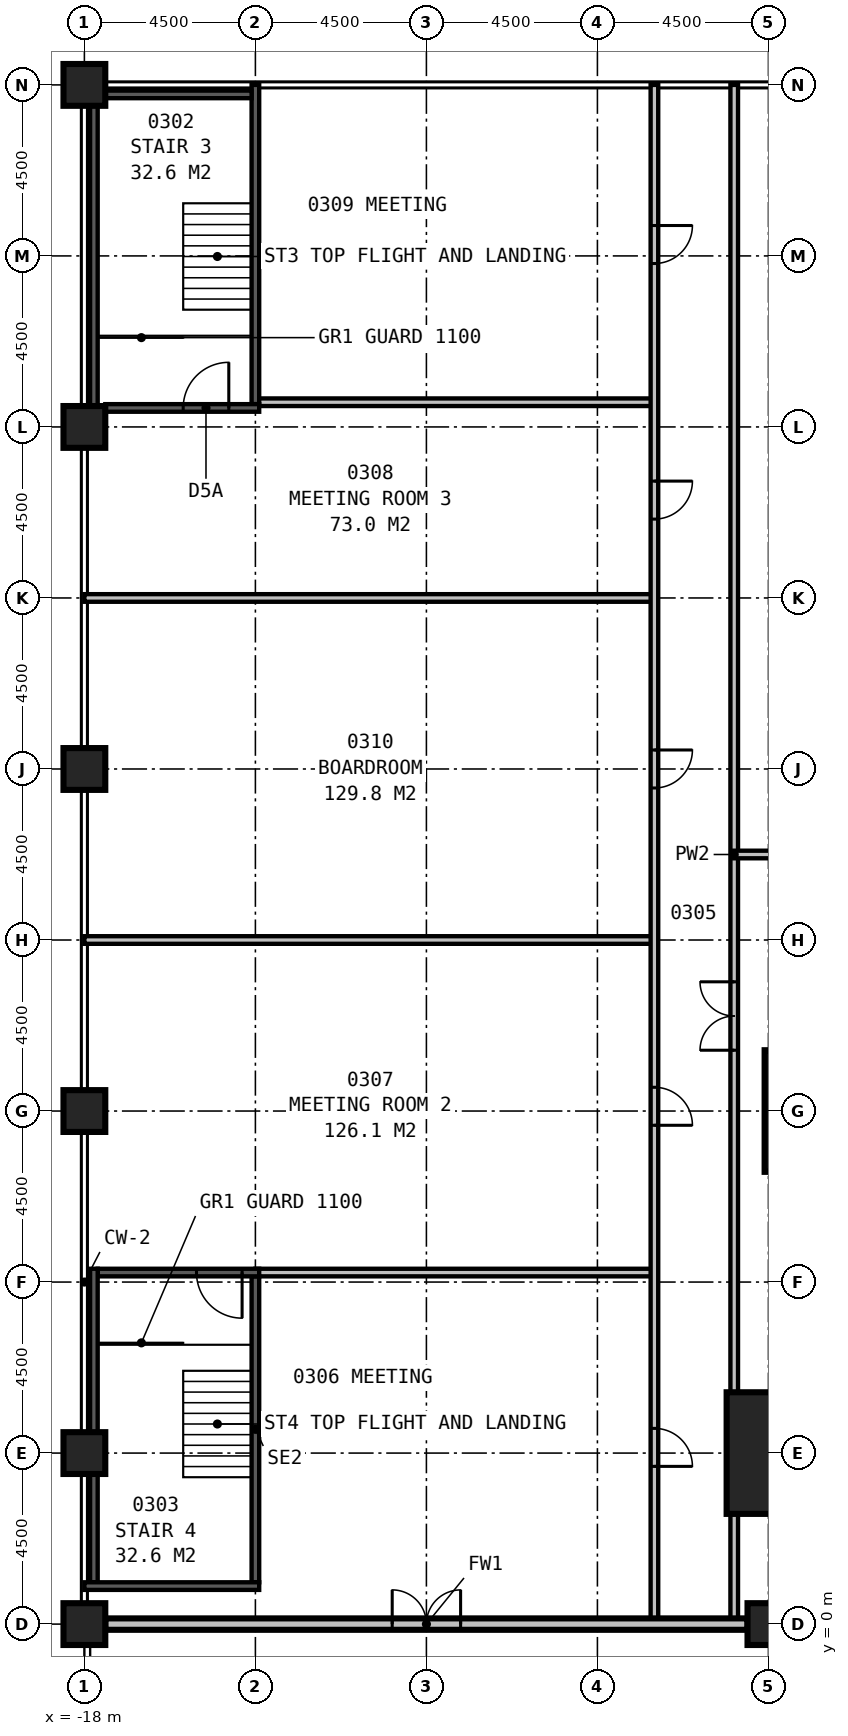
"""IFC4 building model, lengths in metres.
Left out: names, types, materials, properties, quantities, classifications, styles, units other than length and angle.
Written with IfcOpenShell. Run it as: python <this file> out.ifc"""

import sys

from ifc_helpers import new_model, si_unit, direction, frame, frame_2d, origin, origin_2d, place, context, subcontext, project, spatial, rectangle, extrude, element, fill, save


model = new_model("IFC4")
c1 = context("Model", 3, precision=1e-05, world=origin(), true_north=direction((0.0, 1.0)))
c2 = subcontext(c1, "Body", "Model", "MODEL_VIEW")
j1 = project(units=[si_unit("LENGTHUNIT", "METRE"), si_unit("PLANEANGLEUNIT", "RADIAN")], contexts=[c1])
p1 = place(None, origin())
s1 = spatial("IfcSite", under=j1, at=p1, CompositionType="ELEMENT")
p2 = place(p1, origin())
s2 = spatial("IfcBuilding", under=s1, at=p2, CompositionType="ELEMENT")
p3 = place(p2, frame((0.0, 0.0, 19.0)))
s3 = spatial("IfcBuildingStorey", under=s2, at=p3, CompositionType="ELEMENT", Elevation=19.0)
for number, where, z_axis, x_axis in (
    (1, (0.5, 4.5, 0.0), (0.0, 0.0, 1.0), (1.0, 0.0, 0.0)),
    (2, (1.5, 13.5, 0.0), (0.0, 0.0, 1.0), (1.0, 0.0, 0.0)),
):
    element("IfcColumn", number, at=place(p3, frame(where, z_axis=z_axis, x_axis=x_axis)), inside=s3, PredefinedType="COLUMN", context=c2, shape_type="SweptSolid", body=[
        extrude(rectangle(XDim=3.2, YDim=3.2, at=origin_2d()), origin(), (0.0, 0.0, 1.0), 5.0),
    ])
for number, where, z_axis, x_axis in (
    (3, (-18.0, 4.5, 0.0), (0.0, 0.0, 1.0), (1.0, 0.0, 0.0)),
    (4, (-18.0, 13.5, 0.0), (0.0, 0.0, 1.0), (1.0, 0.0, 0.0)),
    (5, (-18.0, 22.5, 0.0), (0.0, 0.0, 1.0), (1.0, 0.0, 0.0)),
    (6, (-18.0, 31.5, 0.0), (0.0, 0.0, 1.0), (1.0, 0.0, 0.0)),
    (7, (-18.0, 40.5, 0.0), (0.0, 0.0, 1.0), (1.0, 0.0, 0.0)),
    (8, (-18.0, 0.0, 0.0), (0.0, 0.0, 1.0), (1.0, 0.0, 0.0)),
    (9, (0.0, 0.0, 0.0), (0.0, 0.0, 1.0), (1.0, 0.0, 0.0)),
):
    element("IfcColumn", number, at=place(p3, frame(where, z_axis=z_axis, x_axis=x_axis)), inside=s3, PredefinedType="COLUMN", context=c2, shape_type="SweptSolid", body=[
        extrude(rectangle(XDim=1.1, YDim=1.1, at=origin_2d()), origin(), (0.0, 0.0, 1.0), 5.0),
    ])
p4 = place(p3, frame((-17.45, 0.0, 0.0), z_axis=(0.0, 0.0, 1.0), x_axis=(1.0, 0.0, 0.0)))
e10 = element("IfcWall", 10, at=p4, inside=s3, PredefinedType="STANDARD", context=c2, shape_type="SweptSolid", body=[
    extrude(rectangle(XDim=16.9, YDim=0.3, at=frame_2d((8.45, 0.0))), origin(), (0.0, 0.0, 1.0), 3.1),
])
p5 = place(p4, frame((7.55, 0.0, 0.0)))
e11 = element("IfcOpeningElement", 11, at=p5, cuts=e10, PredefinedType="OPENING", context=c2, shape_type="SweptSolid", body=[
    extrude(rectangle(XDim=1.8, YDim=2.4, at=frame_2d((0.9, 1.2))), frame((0.0, 0.16, 0.0), z_axis=(0.0, -1.0, 0.0), x_axis=(1.0, 0.0, 0.0)), (0.0, 0.0, 1.0), 0.32),
])
p6 = place(p3, frame((-17.45, 32.0, 0.0), z_axis=(0.0, 0.0, 1.0), x_axis=(1.0, 0.0, 0.0)))
e12 = element("IfcWall", 12, at=p6, inside=s3, PredefinedType="SOLIDWALL", context=c2, shape_type="SweptSolid", body=[
    extrude(rectangle(XDim=4.05, YDim=0.2, at=frame_2d((2.025, 0.0))), origin(), (0.0, 0.0, 1.0), 4.7),
])
p7 = place(p6, frame((2.05, 0.0, 0.0)))
e13 = element("IfcOpeningElement", 13, at=p7, cuts=e12, PredefinedType="OPENING", context=c2, shape_type="SweptSolid", body=[
    extrude(rectangle(XDim=1.2, YDim=2.1, at=frame_2d((0.6, 1.05))), frame((0.0, 0.11, 0.0), z_axis=(0.0, -1.0, 0.0), x_axis=(1.0, 0.0, 0.0)), (0.0, 0.0, 1.0), 0.22),
])
p8 = place(p3, frame((-13.5, 32.1, 0.0), z_axis=(0.0, 0.0, 1.0), x_axis=(0.0, 1.0, 0.0)))
e14 = element("IfcWall", 14, at=p8, inside=s3, PredefinedType="SOLIDWALL", context=c2, shape_type="SweptSolid", body=[
    extrude(rectangle(XDim=8.4, YDim=0.2, at=frame_2d((4.2, 0.0))), origin(), (0.0, 0.0, 1.0), 4.7),
])
p9 = place(p3, frame((-17.65, 9.25, 0.0), z_axis=(0.0, 0.0, 1.0), x_axis=(1.0, 0.0, 0.0)))
e15 = element("IfcWall", 15, at=p9, inside=s3, PredefinedType="SOLIDWALL", context=c2, shape_type="SweptSolid", body=[
    extrude(rectangle(XDim=4.25, YDim=0.2, at=frame_2d((2.125, 0.0))), origin(), (0.0, 0.0, 1.0), 4.7),
])
p10 = place(p9, frame((3.8, 0.0, 0.0), z_axis=(0.0, 0.0, 1.0), x_axis=(-1.0, 0.0, 0.0)))
e16 = element("IfcOpeningElement", 16, at=p10, cuts=e15, PredefinedType="OPENING", context=c2, shape_type="SweptSolid", body=[
    extrude(rectangle(XDim=1.2, YDim=2.1, at=frame_2d((0.6, 1.05))), frame((0.0, 0.11, 0.0), z_axis=(0.0, -1.0, 0.0), x_axis=(1.0, 0.0, 0.0)), (0.0, 0.0, 1.0), 0.22),
])
p11 = place(p3, frame((-18.0, 1.0, 0.0), z_axis=(0.0, 0.0, 1.0), x_axis=(1.0, 0.0, 0.0)))
e17 = element("IfcWall", 17, at=p11, inside=s3, PredefinedType="SOLIDWALL", context=c2, shape_type="SweptSolid", body=[
    extrude(rectangle(XDim=4.6, YDim=0.2, at=frame_2d((2.3, 0.0))), origin(), (0.0, 0.0, 1.0), 4.7),
])
p12 = place(p3, frame((-13.5, 1.1, 0.0), z_axis=(0.0, 0.0, 1.0), x_axis=(0.0, 1.0, 0.0)))
e18 = element("IfcWall", 18, at=p12, inside=s3, PredefinedType="SOLIDWALL", context=c2, shape_type="SweptSolid", body=[
    extrude(rectangle(XDim=8.05, YDim=0.2, at=frame_2d((4.025, 0.0))), origin(), (0.0, 0.0, 1.0), 4.7),
])
p13 = place(p3, frame((-17.75, 32.05, 0.0), z_axis=(0.0, 0.0, 1.0), x_axis=(0.0, 1.0, 0.0)))
e19 = element("IfcWall", 19, at=p13, inside=s3, PredefinedType="SOLIDWALL", context=c2, shape_type="SweptSolid", body=[
    extrude(rectangle(XDim=7.9, YDim=0.2, at=frame_2d((3.95, 0.0))), origin(), (0.0, 0.0, 1.0), 3.0),
])
p14 = place(p3, frame((-17.45, 40.25, 0.0), z_axis=(0.0, 0.0, 1.0), x_axis=(1.0, 0.0, 0.0)))
e20 = element("IfcWall", 20, at=p14, inside=s3, PredefinedType="SOLIDWALL", context=c2, shape_type="SweptSolid", body=[
    extrude(rectangle(XDim=3.85, YDim=0.2, at=frame_2d((1.925, 0.0))), origin(), (0.0, 0.0, 1.0), 4.7),
])
p15 = place(p3, frame((-17.75, 1.1, 0.0), z_axis=(0.0, 0.0, 1.0), x_axis=(0.0, 1.0, 0.0)))
e21 = element("IfcWall", 21, at=p15, inside=s3, PredefinedType="SOLIDWALL", context=c2, shape_type="SweptSolid", body=[
    extrude(rectangle(XDim=2.85, YDim=0.2, at=frame_2d((1.425, 0.0))), origin(), (0.0, 0.0, 1.0), 3.7),
])
p16 = place(p3, frame((-17.75, 5.05, 0.0), z_axis=(0.0, 0.0, 1.0), x_axis=(0.0, 1.0, 0.0)))
e22 = element("IfcWall", 22, at=p16, inside=s3, PredefinedType="SOLIDWALL", context=c2, shape_type="SweptSolid", body=[
    extrude(rectangle(XDim=4.3, YDim=0.2, at=frame_2d((2.15, 0.0))), origin(), (0.0, 0.0, 1.0), 3.0),
])
p17 = place(p3, frame((-0.9, 0.0, 0.0), z_axis=(0.0, 0.0, 1.0), x_axis=(0.0, 1.0, 0.0)))
e23 = element("IfcWall", 23, at=p17, inside=s3, PredefinedType="PARTITIONING", context=c2, shape_type="SweptSolid", body=[
    extrude(rectangle(XDim=40.5, YDim=0.2, at=frame_2d((20.25, 0.0))), origin(), (0.0, 0.0, 1.0), 4.7),
])
p18 = place(p17, frame((15.1, 0.0, 0.0)))
e24 = element("IfcOpeningElement", 24, at=p18, cuts=e23, PredefinedType="OPENING", context=c2, shape_type="SweptSolid", body=[
    extrude(rectangle(XDim=1.8, YDim=2.4, at=frame_2d((0.9, 1.2))), frame((0.0, 0.11, 0.0), z_axis=(0.0, -1.0, 0.0), x_axis=(1.0, 0.0, 0.0)), (0.0, 0.0, 1.0), 0.22),
])
p19 = place(p3, frame((-3.0, 0.0, 0.0), z_axis=(0.0, 0.0, 1.0), x_axis=(0.0, 1.0, 0.0)))
e25 = element("IfcWall", 25, at=p19, inside=s3, PredefinedType="PARTITIONING", context=c2, shape_type="SweptSolid", body=[
    extrude(rectangle(XDim=40.5, YDim=0.2, at=frame_2d((20.25, 0.0))), origin(), (0.0, 0.0, 1.0), 4.7),
])
p20 = place(p19, frame((5.15, 0.0, 0.0), z_axis=(0.0, 0.0, 1.0), x_axis=(-1.0, 0.0, 0.0)))
e26 = element("IfcOpeningElement", 26, at=p20, cuts=e25, PredefinedType="OPENING", context=c2, shape_type="SweptSolid", body=[
    extrude(rectangle(XDim=1.0, YDim=2.1, at=frame_2d((0.5, 1.05))), frame((0.0, 0.11, 0.0), z_axis=(0.0, -1.0, 0.0), x_axis=(1.0, 0.0, 0.0)), (0.0, 0.0, 1.0), 0.22),
])
p21 = place(p19, frame((14.125, 0.0, 0.0), z_axis=(0.0, 0.0, 1.0), x_axis=(-1.0, 0.0, 0.0)))
e27 = element("IfcOpeningElement", 27, at=p21, cuts=e25, PredefinedType="OPENING", context=c2, shape_type="SweptSolid", body=[
    extrude(rectangle(XDim=1.0, YDim=2.1, at=frame_2d((0.5, 1.05))), frame((0.0, 0.11, 0.0), z_axis=(0.0, -1.0, 0.0), x_axis=(1.0, 0.0, 0.0)), (0.0, 0.0, 1.0), 0.22),
])
p22 = place(p19, frame((30.075, 0.0, 0.0), z_axis=(0.0, 0.0, 1.0), x_axis=(-1.0, 0.0, 0.0)))
e28 = element("IfcOpeningElement", 28, at=p22, cuts=e25, PredefinedType="OPENING", context=c2, shape_type="SweptSolid", body=[
    extrude(rectangle(XDim=1.0, YDim=2.1, at=frame_2d((0.5, 1.05))), frame((0.0, 0.11, 0.0), z_axis=(0.0, -1.0, 0.0), x_axis=(1.0, 0.0, 0.0)), (0.0, 0.0, 1.0), 0.22),
])
p23 = place(p19, frame((36.8, 0.0, 0.0), z_axis=(0.0, 0.0, 1.0), x_axis=(-1.0, 0.0, 0.0)))
e29 = element("IfcOpeningElement", 29, at=p23, cuts=e25, PredefinedType="OPENING", context=c2, shape_type="SweptSolid", body=[
    extrude(rectangle(XDim=1.0, YDim=2.1, at=frame_2d((0.5, 1.05))), frame((0.0, 0.11, 0.0), z_axis=(0.0, -1.0, 0.0), x_axis=(1.0, 0.0, 0.0)), (0.0, 0.0, 1.0), 0.22),
])
p24 = place(p19, frame((23.0, 0.0, 0.0), z_axis=(0.0, 0.0, 1.0), x_axis=(-1.0, 0.0, 0.0)))
e30 = element("IfcOpeningElement", 30, at=p24, cuts=e25, PredefinedType="OPENING", context=c2, shape_type="SweptSolid", body=[
    extrude(rectangle(XDim=1.0, YDim=2.1, at=frame_2d((0.5, 1.05))), frame((0.0, 0.11, 0.0), z_axis=(0.0, -1.0, 0.0), x_axis=(1.0, 0.0, 0.0)), (0.0, 0.0, 1.0), 0.22),
])
p25 = place(p3, frame((-18.0, 18.0, 0.0), z_axis=(0.0, 0.0, 1.0), x_axis=(1.0, 0.0, 0.0)))
e31 = element("IfcWall", 31, at=p25, inside=s3, PredefinedType="PARTITIONING", context=c2, shape_type="SweptSolid", body=[
    extrude(rectangle(XDim=15.0, YDim=0.2, at=frame_2d((7.5, 0.0))), origin(), (0.0, 0.0, 1.0), 4.7),
])
for number, where, z_axis, x_axis in (
    (32, (-13.5, 9.25, 0.0), (0.0, 0.0, 1.0), (1.0, 0.0, 0.0)),
    (33, (-13.5, 32.15, 0.0), (0.0, 0.0, 1.0), (1.0, 0.0, 0.0)),
):
    element("IfcWall", number, at=place(p3, frame(where, z_axis=z_axis, x_axis=x_axis)), inside=s3, PredefinedType="PARTITIONING", context=c2, shape_type="SweptSolid", body=[
        extrude(rectangle(XDim=10.5, YDim=0.2, at=frame_2d((5.25, 0.0))), origin(), (0.0, 0.0, 1.0), 4.7),
    ])
p26 = place(p3, frame((-18.0, 27.0, 0.0), z_axis=(0.0, 0.0, 1.0), x_axis=(1.0, 0.0, 0.0)))
e34 = element("IfcWall", 34, at=p26, inside=s3, PredefinedType="PARTITIONING", context=c2, shape_type="SweptSolid", body=[
    extrude(rectangle(XDim=15.0, YDim=0.2, at=frame_2d((7.5, 0.0))), origin(), (0.0, 0.0, 1.0), 4.7),
])
p27 = place(p3, frame((-0.9, 20.25, 0.0), z_axis=(0.0, 0.0, 1.0), x_axis=(1.0, 0.0, 0.0)))
e35 = element("IfcWall", 35, at=p27, inside=s3, PredefinedType="PARTITIONING", context=c2, shape_type="SweptSolid", body=[
    extrude(rectangle(XDim=14.1, YDim=0.2, at=frame_2d((7.05, 0.0))), origin(), (0.0, 0.0, 1.0), 4.7),
])
p28 = place(p27, frame((5.0, 0.0, 0.0)))
e36 = element("IfcOpeningElement", 36, at=p28, cuts=e35, PredefinedType="OPENING", context=c2, shape_type="SweptSolid", body=[
    extrude(rectangle(XDim=1.8, YDim=2.4, at=frame_2d((0.9, 1.2))), frame((0.0, 0.11, 0.0), z_axis=(0.0, -1.0, 0.0), x_axis=(1.0, 0.0, 0.0)), (0.0, 0.0, 1.0), 0.22),
])
p29 = place(p5, origin())
e37 = element("IfcDoor", 37, at=p29, inside=s3, OperationType="DOUBLE_DOOR_SINGLE_SWING", PredefinedType="DOOR", context=c2, shape_type="SweptSolid", body=[
    extrude(rectangle(XDim=1.8, YDim=2.4, at=frame_2d((0.9, 1.2))), frame((0.0, 0.025, 0.0), z_axis=(0.0, -1.0, 0.0), x_axis=(1.0, 0.0, 0.0)), (0.0, 0.0, 1.0), 0.05),
])
fill(e11, e37)
p30 = place(p7, origin())
e38 = element("IfcDoor", 38, at=p30, inside=s3, OperationType="SINGLE_SWING_RIGHT", PredefinedType="DOOR", context=c2, shape_type="SweptSolid", body=[
    extrude(rectangle(XDim=1.2, YDim=2.1, at=frame_2d((0.6, 1.05))), frame((0.0, 0.025, 0.0), z_axis=(0.0, -1.0, 0.0), x_axis=(1.0, 0.0, 0.0)), (0.0, 0.0, 1.0), 0.05),
])
fill(e13, e38)
p31 = place(p10, origin())
e39 = element("IfcDoor", 39, at=p31, inside=s3, OperationType="SINGLE_SWING_LEFT", PredefinedType="DOOR", context=c2, shape_type="SweptSolid", body=[
    extrude(rectangle(XDim=1.2, YDim=2.1, at=frame_2d((0.6, 1.05))), frame((0.0, 0.025, 0.0), z_axis=(0.0, -1.0, 0.0), x_axis=(1.0, 0.0, 0.0)), (0.0, 0.0, 1.0), 0.05),
])
fill(e16, e39)
p32 = place(p18, origin())
e40 = element("IfcDoor", 40, at=p32, inside=s3, OperationType="DOUBLE_DOOR_SINGLE_SWING", PredefinedType="DOOR", context=c2, shape_type="SweptSolid", body=[
    extrude(rectangle(XDim=1.8, YDim=2.4, at=frame_2d((0.9, 1.2))), frame((0.0, 0.025, 0.0), z_axis=(0.0, -1.0, 0.0), x_axis=(1.0, 0.0, 0.0)), (0.0, 0.0, 1.0), 0.05),
])
fill(e24, e40)
p33 = place(p20, origin())
e41 = element("IfcDoor", 41, at=p33, inside=s3, OperationType="SINGLE_SWING_RIGHT", PredefinedType="DOOR", context=c2, shape_type="SweptSolid", body=[
    extrude(rectangle(XDim=1.0, YDim=2.1, at=frame_2d((0.5, 1.05))), frame((0.0, 0.025, 0.0), z_axis=(0.0, -1.0, 0.0), x_axis=(1.0, 0.0, 0.0)), (0.0, 0.0, 1.0), 0.05),
])
fill(e26, e41)
p34 = place(p21, origin())
e42 = element("IfcDoor", 42, at=p34, inside=s3, OperationType="SINGLE_SWING_RIGHT", PredefinedType="DOOR", context=c2, shape_type="SweptSolid", body=[
    extrude(rectangle(XDim=1.0, YDim=2.1, at=frame_2d((0.5, 1.05))), frame((0.0, 0.025, 0.0), z_axis=(0.0, -1.0, 0.0), x_axis=(1.0, 0.0, 0.0)), (0.0, 0.0, 1.0), 0.05),
])
fill(e27, e42)
p35 = place(p22, origin())
e43 = element("IfcDoor", 43, at=p35, inside=s3, OperationType="SINGLE_SWING_LEFT", PredefinedType="DOOR", context=c2, shape_type="SweptSolid", body=[
    extrude(rectangle(XDim=1.0, YDim=2.1, at=frame_2d((0.5, 1.05))), frame((0.0, 0.025, 0.0), z_axis=(0.0, -1.0, 0.0), x_axis=(1.0, 0.0, 0.0)), (0.0, 0.0, 1.0), 0.05),
])
fill(e28, e43)
p36 = place(p23, origin())
e44 = element("IfcDoor", 44, at=p36, inside=s3, OperationType="SINGLE_SWING_LEFT", PredefinedType="DOOR", context=c2, shape_type="SweptSolid", body=[
    extrude(rectangle(XDim=1.0, YDim=2.1, at=frame_2d((0.5, 1.05))), frame((0.0, 0.025, 0.0), z_axis=(0.0, -1.0, 0.0), x_axis=(1.0, 0.0, 0.0)), (0.0, 0.0, 1.0), 0.05),
])
fill(e29, e44)
p37 = place(p24, origin())
e45 = element("IfcDoor", 45, at=p37, inside=s3, OperationType="SINGLE_SWING_LEFT", PredefinedType="DOOR", context=c2, shape_type="SweptSolid", body=[
    extrude(rectangle(XDim=1.0, YDim=2.1, at=frame_2d((0.5, 1.05))), frame((0.0, 0.025, 0.0), z_axis=(0.0, -1.0, 0.0), x_axis=(1.0, 0.0, 0.0)), (0.0, 0.0, 1.0), 0.05),
])
fill(e30, e45)
save(model, sys.argv[1])
